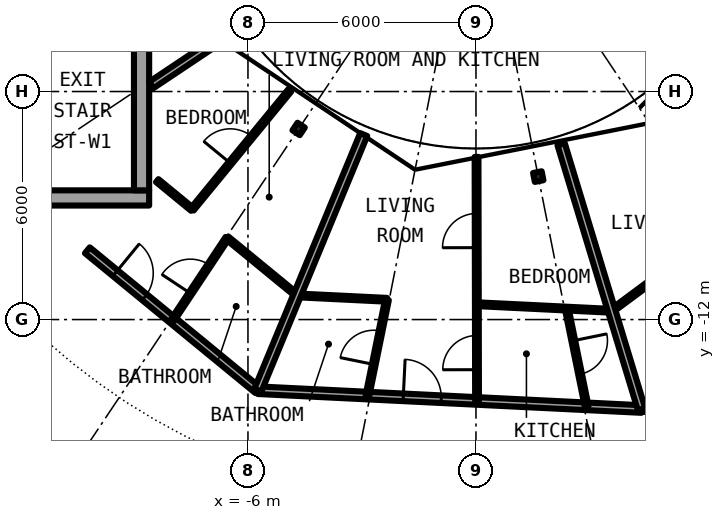
"""IFC4 building model, lengths in metres.
Left out: names, types, materials, properties, quantities, classifications, styles, units other than length and angle.
Written with IfcOpenShell. Run it as: python <this file> out.ifc"""

import sys

from ifc_helpers import new_model, si_unit, direction, frame, frame_2d, origin, origin_2d, place, context, subcontext, project, spatial, rectangle, i_section, extrude, element, fill, save


model = new_model("IFC4")
c1 = context("Model", 3, precision=1e-05, world=origin(), true_north=direction((0.0, 1.0)))
c2 = subcontext(c1, "Body", "Model", "MODEL_VIEW")
j1 = project(units=[si_unit("LENGTHUNIT", "METRE"), si_unit("PLANEANGLEUNIT", "RADIAN")], contexts=[c1])
p1 = place(None, origin())
s1 = spatial("IfcSite", under=j1, at=p1, CompositionType="ELEMENT")
p2 = place(p1, origin())
s2 = spatial("IfcBuilding", under=s1, at=p2, CompositionType="ELEMENT")
p3 = place(p2, frame((0.0, 0.0, 237.1)))
s3 = spatial("IfcBuildingStorey", under=s2, at=p3, CompositionType="ELEMENT", Elevation=237.1)
for number, where, z_axis, x_axis in (
    (1, (-4.667, -6.984, 0.0), (0.0, 0.0, 1.0), (-0.556, -0.831, 0.0)),
    (2, (1.639, -8.239, 0.0), (0.0, 0.0, 1.0), (0.195, -0.981, 0.0)),
):
    element("IfcColumn", number, at=place(p3, frame(where, z_axis=z_axis, x_axis=x_axis)), inside=s3, PredefinedType="COLUMN", context=c2, shape_type="SweptSolid", body=[
        extrude(i_section(OverallWidth=0.24, OverallDepth=0.23, WebThickness=0.008, FlangeThickness=0.012, FilletRadius=0.021, at=origin_2d()), origin(), (0.0, 0.0, 1.0), 3.05),
    ])
p4 = place(p3, frame((-22.0, -8.8, 0.0), z_axis=(0.0, 0.0, 1.0), x_axis=(1.0, 0.0, 0.0)))
e3 = element("IfcWall", 3, at=p4, inside=s3, PredefinedType="SHEAR", context=c2, shape_type="SweptSolid", body=[
    extrude(rectangle(XDim=13.4, YDim=0.4, at=frame_2d((6.7, 0.0))), origin(), (0.0, 0.0, 1.0), 3.05),
])
p5 = place(p4, frame((0.925, 0.0, 0.0)))
e4 = element("IfcOpeningElement", 4, at=p5, cuts=e3, PredefinedType="OPENING", context=c2, shape_type="SweptSolid", body=[
    extrude(rectangle(XDim=1.2, YDim=2.3, at=frame_2d((0.6, 1.15))), frame((0.0, 0.21, 0.0), z_axis=(0.0, -1.0, 0.0), x_axis=(1.0, 0.0, 0.0)), (0.0, 0.0, 1.0), 0.42),
])
p6 = place(p3, frame((-8.8, 8.6, 0.0), z_axis=(0.0, 0.0, 1.0), x_axis=(0.0, -1.0, 0.0)))
e5 = element("IfcWall", 5, at=p6, inside=s3, PredefinedType="SHEAR", context=c2, shape_type="SweptSolid", body=[
    extrude(rectangle(XDim=17.2, YDim=0.4, at=frame_2d((8.6, 0.0))), origin(), (0.0, 0.0, 1.0), 3.05),
])
p7 = place(p6, frame((7.4, 0.0, 0.1)))
e6 = element("IfcOpeningElement", 6, at=p7, cuts=e5, PredefinedType="OPENING", context=c2, shape_type="SweptSolid", body=[
    extrude(rectangle(XDim=2.4, YDim=2.2, at=frame_2d((1.2, 1.1))), frame((0.0, 0.21, 0.0), z_axis=(0.0, -1.0, 0.0), x_axis=(1.0, 0.0, 0.0)), (0.0, 0.0, 1.0), 0.42),
])
p8 = place(p3, frame((-12.434, -15.151, 0.0), z_axis=(0.0, 0.0, 1.0), x_axis=(0.857710084627, -0.514133650648, 0.0)))
e7 = element("IfcWall", 7, at=p8, inside=s3, PredefinedType="PARTITIONING", context=c2, shape_type="SweptSolid", body=[
    extrude(rectangle(XDim=5.751, YDim=0.2, at=frame_2d((2.876, 0.0))), origin(), (0.0, 0.0, 1.0), 2.45),
])
p9 = place(p8, frame((3.333, 0.0, 0.0)))
e8 = element("IfcOpeningElement", 8, at=p9, cuts=e7, PredefinedType="OPENING", context=c2, shape_type="SweptSolid", body=[
    extrude(rectangle(XDim=1.0, YDim=2.3, at=frame_2d((0.5, 1.15))), frame((0.0, 0.11, 0.0), z_axis=(0.0, -1.0, 0.0), x_axis=(1.0, 0.0, 0.0)), (0.0, 0.0, 1.0), 0.22),
])
p10 = place(p3, frame((-10.226, -10.177, 0.0), z_axis=(0.0, 0.0, 1.0), x_axis=(0.773071783484, -0.634318545828, 0.0)))
e9 = element("IfcWall", 9, at=p10, inside=s3, PredefinedType="PARTITIONING", context=c2, shape_type="SweptSolid", body=[
    extrude(rectangle(XDim=5.803, YDim=0.2, at=frame_2d((2.901, 0.0))), origin(), (0.0, 0.0, 1.0), 2.7),
])
p11 = place(p10, frame((0.949, 0.0, 0.0)))
e10 = element("IfcOpeningElement", 10, at=p11, cuts=e9, PredefinedType="OPENING", context=c2, shape_type="SweptSolid", body=[
    extrude(rectangle(XDim=1.0, YDim=2.3, at=frame_2d((0.5, 1.15))), frame((0.0, 0.11, 0.0), z_axis=(0.0, -1.0, 0.0), x_axis=(1.0, 0.0, 0.0)), (0.0, 0.0, 1.0), 0.22),
])
p12 = place(p3, frame((-5.737, -13.859, 0.0), z_axis=(0.0, 0.0, 1.0), x_axis=(0.998799182242, -0.048991770265, 0.0)))
e11 = element("IfcWall", 11, at=p12, inside=s3, PredefinedType="PARTITIONING", context=c2, shape_type="SweptSolid", body=[
    extrude(rectangle(XDim=10.106, YDim=0.2, at=frame_2d((5.053, 0.0))), origin(), (0.0, 0.0, 1.0), 2.7),
])
p13 = place(p12, frame((3.828, 0.0, 0.0)))
e12 = element("IfcOpeningElement", 12, at=p13, cuts=e11, PredefinedType="OPENING", context=c2, shape_type="SweptSolid", body=[
    extrude(rectangle(XDim=1.0, YDim=2.3, at=frame_2d((0.5, 1.15))), frame((0.0, 0.11, 0.0), z_axis=(0.0, -1.0, 0.0), x_axis=(1.0, 0.0, 0.0)), (0.0, 0.0, 1.0), 0.22),
])
p14 = place(p3, frame((4.354, -14.354, 0.0), z_axis=(0.0, 0.0, 1.0), x_axis=(0.80331688802, 0.595551825974, 0.0)))
e13 = element("IfcWall", 13, at=p14, inside=s3, PredefinedType="PARTITIONING", context=c2, shape_type="SweptSolid", body=[
    extrude(rectangle(XDim=8.659, YDim=0.2, at=frame_2d((4.33, 0.0))), origin(), (0.0, 0.0, 1.0), 2.7),
])
p15 = place(p14, frame((3.832, 0.0, 0.0)))
e14 = element("IfcOpeningElement", 14, at=p15, cuts=e13, PredefinedType="OPENING", context=c2, shape_type="SweptSolid", body=[
    extrude(rectangle(XDim=1.0, YDim=2.3, at=frame_2d((0.5, 1.15))), frame((0.0, 0.11, 0.0), z_axis=(0.0, -1.0, 0.0), x_axis=(1.0, 0.0, 0.0)), (0.0, 0.0, 1.0), 0.22),
])
p16 = place(p3, frame((-8.387, -8.344, 0.0), z_axis=(0.0, 0.0, 1.0), x_axis=(0.772869802794, -0.634564628646, 0.0)))
e15 = element("IfcWall", 15, at=p16, inside=s3, PredefinedType="PARTITIONING", context=c2, shape_type="SweptSolid", body=[
    extrude(rectangle(XDim=1.192, YDim=0.1, at=frame_2d((0.596, 0.0))), origin(), (0.0, 0.0, 1.0), 2.7),
])
p17 = place(p3, frame((-6.547, -9.854, 0.0), z_axis=(0.0, 0.0, 1.0), x_axis=(0.773033390712, -0.634365333893, 0.0)))
e16 = element("IfcWall", 16, at=p17, inside=s3, PredefinedType="PARTITIONING", context=c2, shape_type="SweptSolid", body=[
    extrude(rectangle(XDim=2.38, YDim=0.1, at=frame_2d((1.19, 0.0))), origin(), (0.0, 0.0, 1.0), 2.7),
])
p18 = place(p3, frame((-4.707, -11.364, 0.0), z_axis=(0.0, 0.0, 1.0), x_axis=(0.998799958351, -0.048975945103, 0.0)))
e17 = element("IfcWall", 17, at=p18, inside=s3, PredefinedType="PARTITIONING", context=c2, shape_type="SweptSolid", body=[
    extrude(rectangle(XDim=2.368, YDim=0.1, at=frame_2d((1.184, 0.0))), origin(), (0.0, 0.0, 1.0), 2.7),
])
p19 = place(p3, frame((0.023, -11.596, 0.0), z_axis=(0.0, 0.0, 1.0), x_axis=(0.998798689193, -0.049001821055, 0.0)))
e18 = element("IfcWall", 18, at=p19, inside=s3, PredefinedType="PARTITIONING", context=c2, shape_type="SweptSolid", body=[
    extrude(rectangle(XDim=3.552, YDim=0.1, at=frame_2d((1.776, 0.0))), origin(), (0.0, 0.0, 1.0), 2.7),
])
p20 = place(p3, frame((3.571, -11.77, 0.0), z_axis=(0.0, 0.0, 1.0), x_axis=(0.803182415278, 0.59573316828, 0.0)))
e19 = element("IfcWall", 19, at=p20, inside=s3, PredefinedType="PARTITIONING", context=c2, shape_type="SweptSolid", body=[
    extrude(rectangle(XDim=2.367, YDim=0.1, at=frame_2d((1.183, 0.0))), origin(), (0.0, 0.0, 1.0), 2.7),
])
p21 = place(p3, frame((-6.513, -4.472, 0.0), z_axis=(0.0, 0.0, 1.0), x_axis=(-0.831450132577, -0.555599385382, 0.0)))
e20 = element("IfcWall", 20, at=p21, inside=s3, PredefinedType="PARTITIONING", context=c2, shape_type="SweptSolid", body=[
    extrude(rectangle(XDim=2.443, YDim=0.2, at=frame_2d((1.221, 0.0))), origin(), (0.0, 0.0, 1.0), 2.7),
])
p22 = place(p3, frame((-7.984, -12.017, 0.0), z_axis=(0.0, 0.0, 1.0), x_axis=(0.553289146762, 0.832989267683, 0.0)))
e21 = element("IfcWall", 21, at=p22, inside=s3, PredefinedType="PARTITIONING", context=c2, shape_type="SweptSolid", body=[
    extrude(rectangle(XDim=2.597, YDim=0.1, at=frame_2d((1.298, 0.0))), origin(), (0.0, 0.0, 1.0), 2.7),
])
p23 = place(p22, frame((0.848, 0.0, 0.0)))
e22 = element("IfcOpeningElement", 22, at=p23, cuts=e21, PredefinedType="OPENING", context=c2, shape_type="SweptSolid", body=[
    extrude(rectangle(XDim=0.9, YDim=2.3, at=frame_2d((0.45, 1.15))), frame((0.0, 0.06, 0.0), z_axis=(0.0, -1.0, 0.0), x_axis=(1.0, 0.0, 0.0)), (0.0, 0.0, 1.0), 0.12),
])
p24 = place(p3, frame((-7.467, -9.099, 0.0), z_axis=(0.0, 0.0, 1.0), x_axis=(0.634313840507, 0.773075644256, 0.0)))
e23 = element("IfcWall", 23, at=p24, inside=s3, PredefinedType="PARTITIONING", context=c2, shape_type="SweptSolid", body=[
    extrude(rectangle(XDim=4.05, YDim=0.1, at=frame_2d((2.025, 0.0))), origin(), (0.0, 0.0, 1.0), 2.7),
])
p25 = place(p24, frame((1.575, 0.0, 0.0)))
e24 = element("IfcOpeningElement", 24, at=p25, cuts=e23, PredefinedType="OPENING", context=c2, shape_type="SweptSolid", body=[
    extrude(rectangle(XDim=0.9, YDim=2.3, at=frame_2d((0.45, 1.15))), frame((0.0, 0.06, 0.0), z_axis=(0.0, -1.0, 0.0), x_axis=(1.0, 0.0, 0.0)), (0.0, 0.0, 1.0), 0.12),
])
p26 = place(p3, frame((-5.74, -13.858, 0.0), z_axis=(0.0, 0.0, 1.0), x_axis=(0.38267858248, 0.923881541385, 0.0)))
e25 = element("IfcWall", 25, at=p26, inside=s3, PredefinedType="PARTITIONING", context=c2, shape_type="SweptSolid", body=[
    extrude(rectangle(XDim=7.28, YDim=0.2, at=frame_2d((3.64, 0.0))), origin(), (0.0, 0.0, 1.0), 2.7),
])
p27 = place(p3, frame((-2.856, -14.0, 0.0), z_axis=(0.0, 0.0, 1.0), x_axis=(0.199820523641, 0.979832515449, 0.0)))
e26 = element("IfcWall", 26, at=p27, inside=s3, PredefinedType="PARTITIONING", context=c2, shape_type="SweptSolid", body=[
    extrude(rectangle(XDim=2.572, YDim=0.1, at=frame_2d((1.286, 0.0))), origin(), (0.0, 0.0, 1.0), 2.7),
])
p28 = place(p27, frame((0.836, 0.0, 0.0)))
e27 = element("IfcOpeningElement", 27, at=p28, cuts=e26, PredefinedType="OPENING", context=c2, shape_type="SweptSolid", body=[
    extrude(rectangle(XDim=0.9, YDim=2.3, at=frame_2d((0.45, 1.15))), frame((0.0, 0.06, 0.0), z_axis=(0.0, -1.0, 0.0), x_axis=(1.0, 0.0, 0.0)), (0.0, 0.0, 1.0), 0.12),
])
p29 = place(p3, frame((0.028, -14.142, 0.0), z_axis=(0.0, 0.0, 1.0), x_axis=(-0.00205283734, 0.999997892927, 0.0)))
e28 = element("IfcWall", 28, at=p29, inside=s3, PredefinedType="PARTITIONING", context=c2, shape_type="SweptSolid", body=[
    extrude(rectangle(XDim=6.422, YDim=0.1, at=frame_2d((3.211, 0.0))), origin(), (0.0, 0.0, 1.0), 2.7),
])
p30 = place(p29, frame((0.823, 0.0, 0.0)))
e29 = element("IfcOpeningElement", 29, at=p30, cuts=e28, PredefinedType="OPENING", context=c2, shape_type="SweptSolid", body=[
    extrude(rectangle(XDim=0.9, YDim=2.3, at=frame_2d((0.45, 1.15))), frame((0.0, 0.06, 0.0), z_axis=(0.0, -1.0, 0.0), x_axis=(1.0, 0.0, 0.0)), (0.0, 0.0, 1.0), 0.12),
])
p31 = place(p29, frame((4.034, 0.0, 0.0)))
e30 = element("IfcOpeningElement", 30, at=p31, cuts=e28, PredefinedType="OPENING", context=c2, shape_type="SweptSolid", body=[
    extrude(rectangle(XDim=0.9, YDim=2.3, at=frame_2d((0.45, 1.15))), frame((0.0, 0.06, 0.0), z_axis=(0.0, -1.0, 0.0), x_axis=(1.0, 0.0, 0.0)), (0.0, 0.0, 1.0), 0.12),
])
p32 = place(p3, frame((2.241, -7.388, 0.0), z_axis=(0.0, 0.0, 1.0), x_axis=(0.29039551313, -0.956906707027, 0.0)))
e31 = element("IfcWall", 31, at=p32, inside=s3, PredefinedType="PARTITIONING", context=c2, shape_type="SweptSolid", body=[
    extrude(rectangle(XDim=7.28, YDim=0.2, at=frame_2d((3.64, 0.0))), origin(), (0.0, 0.0, 1.0), 2.7),
])
p33 = place(p3, frame((2.388, -11.712, 0.0), z_axis=(0.0, 0.0, 1.0), x_axis=(0.19976495468, -0.979843846172, 0.0)))
e32 = element("IfcWall", 32, at=p33, inside=s3, PredefinedType="PARTITIONING", context=c2, shape_type="SweptSolid", body=[
    extrude(rectangle(XDim=2.624, YDim=0.1, at=frame_2d((1.312, 0.0))), origin(), (0.0, 0.0, 1.0), 2.7),
])
p34 = place(p33, frame((0.862, 0.0, 0.0)))
e33 = element("IfcOpeningElement", 33, at=p34, cuts=e32, PredefinedType="OPENING", context=c2, shape_type="SweptSolid", body=[
    extrude(rectangle(XDim=0.9, YDim=2.3, at=frame_2d((0.45, 1.15))), frame((0.0, 0.06, 0.0), z_axis=(0.0, -1.0, 0.0), x_axis=(1.0, 0.0, 0.0)), (0.0, 0.0, 1.0), 0.12),
])
p35 = place(p11, origin())
e34 = element("IfcDoor", 34, at=p35, inside=s3, OperationType="SINGLE_SWING_LEFT", PredefinedType="DOOR", context=c2, shape_type="SweptSolid", body=[
    extrude(rectangle(XDim=1.0, YDim=2.3, at=frame_2d((0.5, 1.15))), frame((0.0, 0.025, 0.0), z_axis=(0.0, -1.0, 0.0), x_axis=(1.0, 0.0, 0.0)), (0.0, 0.0, 1.0), 0.05),
])
fill(e10, e34)
p36 = place(p23, origin())
e35 = element("IfcDoor", 35, at=p36, inside=s3, OperationType="SINGLE_SWING_RIGHT", PredefinedType="DOOR", context=c2, shape_type="SweptSolid", body=[
    extrude(rectangle(XDim=0.9, YDim=2.3, at=frame_2d((0.45, 1.15))), frame((0.0, 0.025, 0.0), z_axis=(0.0, -1.0, 0.0), x_axis=(1.0, 0.0, 0.0)), (0.0, 0.0, 1.0), 0.05),
])
fill(e22, e35)
p37 = place(p25, origin())
e36 = element("IfcDoor", 36, at=p37, inside=s3, OperationType="SINGLE_SWING_RIGHT", PredefinedType="DOOR", context=c2, shape_type="SweptSolid", body=[
    extrude(rectangle(XDim=0.9, YDim=2.3, at=frame_2d((0.45, 1.15))), frame((0.0, 0.025, 0.0), z_axis=(0.0, -1.0, 0.0), x_axis=(1.0, 0.0, 0.0)), (0.0, 0.0, 1.0), 0.05),
])
fill(e24, e36)
p38 = place(p13, origin())
e37 = element("IfcDoor", 37, at=p38, inside=s3, OperationType="SINGLE_SWING_LEFT", PredefinedType="DOOR", context=c2, shape_type="SweptSolid", body=[
    extrude(rectangle(XDim=1.0, YDim=2.3, at=frame_2d((0.5, 1.15))), frame((0.0, 0.025, 0.0), z_axis=(0.0, -1.0, 0.0), x_axis=(1.0, 0.0, 0.0)), (0.0, 0.0, 1.0), 0.05),
])
fill(e12, e37)
p39 = place(p28, origin())
e38 = element("IfcDoor", 38, at=p39, inside=s3, OperationType="SINGLE_SWING_RIGHT", PredefinedType="DOOR", context=c2, shape_type="SweptSolid", body=[
    extrude(rectangle(XDim=0.9, YDim=2.3, at=frame_2d((0.45, 1.15))), frame((0.0, 0.025, 0.0), z_axis=(0.0, -1.0, 0.0), x_axis=(1.0, 0.0, 0.0)), (0.0, 0.0, 1.0), 0.05),
])
fill(e27, e38)
p40 = place(p30, origin())
e39 = element("IfcDoor", 39, at=p40, inside=s3, OperationType="SINGLE_SWING_LEFT", PredefinedType="DOOR", context=c2, shape_type="SweptSolid", body=[
    extrude(rectangle(XDim=0.9, YDim=2.3, at=frame_2d((0.45, 1.15))), frame((0.0, 0.025, 0.0), z_axis=(0.0, -1.0, 0.0), x_axis=(1.0, 0.0, 0.0)), (0.0, 0.0, 1.0), 0.05),
])
fill(e29, e39)
p41 = place(p34, origin())
e40 = element("IfcDoor", 40, at=p41, inside=s3, OperationType="SINGLE_SWING_RIGHT", PredefinedType="DOOR", context=c2, shape_type="SweptSolid", body=[
    extrude(rectangle(XDim=0.9, YDim=2.3, at=frame_2d((0.45, 1.15))), frame((0.0, 0.025, 0.0), z_axis=(0.0, -1.0, 0.0), x_axis=(1.0, 0.0, 0.0)), (0.0, 0.0, 1.0), 0.05),
])
fill(e33, e40)
p42 = place(p31, origin())
e41 = element("IfcDoor", 41, at=p42, inside=s3, OperationType="SINGLE_SWING_RIGHT", PredefinedType="DOOR", context=c2, shape_type="SweptSolid", body=[
    extrude(rectangle(XDim=0.9, YDim=2.3, at=frame_2d((0.45, 1.15))), frame((0.0, 0.025, 0.0), z_axis=(0.0, -1.0, 0.0), x_axis=(1.0, 0.0, 0.0)), (0.0, 0.0, 1.0), 0.05),
])
fill(e30, e41)
save(model, sys.argv[1])
